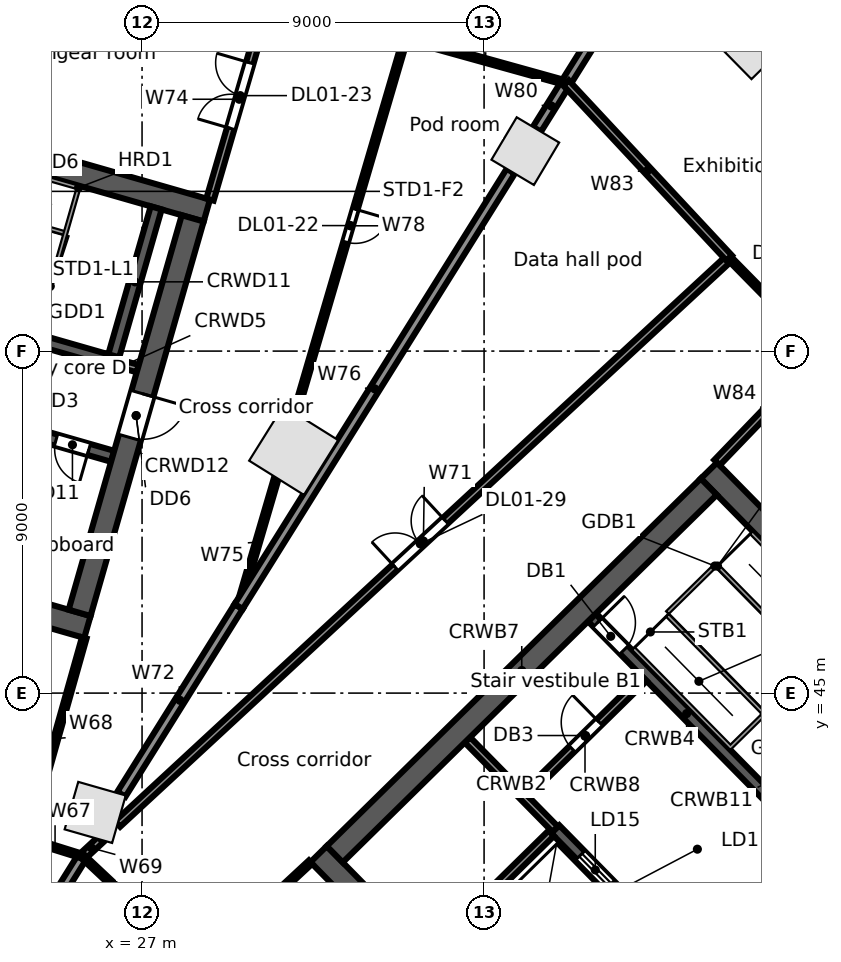
"""IFC4 building model, lengths in metres.
Left out: names, types, materials, properties, quantities, classifications, styles, units other than length and angle.
Written with IfcOpenShell. Run it as: python <this file> out.ifc"""

import sys

from ifc_helpers import new_model, si_unit, direction, frame, frame_2d, origin, origin_2d, place, context, subcontext, project, spatial, rectangle, extrude, element, fill, save


model = new_model("IFC4")
c1 = context("Model", 3, precision=1e-05, world=origin(), true_north=direction((0.0, 1.0)))
c2 = subcontext(c1, "Body", "Model", "MODEL_VIEW")
j1 = project(units=[si_unit("LENGTHUNIT", "METRE"), si_unit("PLANEANGLEUNIT", "RADIAN")], contexts=[c1])
p1 = place(None, origin())
s1 = spatial("IfcSite", under=j1, at=p1, CompositionType="ELEMENT")
p2 = place(p1, origin())
s2 = spatial("IfcBuilding", under=s1, at=p2, CompositionType="ELEMENT")
p3 = place(p2, frame((0.0, 0.0, 11.5)))
s3 = spatial("IfcBuildingStorey", under=s2, at=p3, CompositionType="ELEMENT", Elevation=11.5)
for number, where, z_axis, x_axis in (
    (1, (37.085, 59.262, 0.0), (0.0, 0.0, 1.0), (-0.859, 0.511, 0.0)),
    (2, (25.767, 41.86, 0.0), (0.0, 0.0, 1.0), (0.961, -0.276, 0.0)),
):
    element("IfcColumn", number, at=place(p3, frame(where, z_axis=z_axis, x_axis=x_axis)), inside=s3, PredefinedType="COLUMN", context=c2, shape_type="SweptSolid", body=[
        extrude(rectangle(XDim=1.3, YDim=1.3, at=origin_2d()), origin(), (0.0, 0.0, 1.0), 5.0),
    ])
p4 = place(p3, frame((30.99, 51.386, 0.0), z_axis=(0.0, 0.0, 1.0), x_axis=(0.529919264233, 0.848048096156, 0.0)))
e3 = element("IfcColumn", 3, at=p4, inside=s3, PredefinedType="COLUMN", context=c2, shape_type="SweptSolid", body=[
    extrude(rectangle(XDim=1.7, YDim=1.7, at=origin_2d()), origin(), (0.0, 0.0, 1.0), 5.0),
])
p5 = place(p3, frame((43.042, 61.863, 0.0), z_axis=(0.0, 0.0, 1.0), x_axis=(-0.7009092643, 0.713250449154, 0.0)))
e4 = element("IfcColumn", 4, at=p5, inside=s3, PredefinedType="COLUMN", context=c2, shape_type="SweptSolid", body=[
    extrude(rectangle(XDim=1.0, YDim=1.0, at=origin_2d()), origin(), (0.0, 0.0, 1.0), 5.0),
])
p6 = place(p3, frame((31.646, 40.763, 0.0), z_axis=(0.0, 0.0, 1.0), x_axis=(0.700911255944, -0.713248491965, 0.0)))
e5 = element("IfcWall", 5, at=p6, inside=s3, PredefinedType="SOLIDWALL", context=c2, shape_type="SweptSolid", body=[
    extrude(rectangle(XDim=15.0, YDim=0.6, at=frame_2d((7.5, 0.0))), origin(), (0.0, 0.0, 1.0), 4.65),
])
p7 = place(p6, frame((12.9, 0.0, 0.0)))
e6 = element("IfcOpeningElement", 6, at=p7, cuts=e5, PredefinedType="OPENING", context=c2, shape_type="SweptSolid", body=[
    extrude(rectangle(XDim=1.2, YDim=2.1, at=frame_2d((0.6, 1.05))), frame((0.0, 0.31, 0.0), z_axis=(0.0, -1.0, 0.0), x_axis=(1.0, 0.0, 0.0)), (0.0, 0.0, 1.0), 0.62),
])
p8 = place(p3, frame((35.561, 43.769, 0.0), z_axis=(0.0, 0.0, 1.0), x_axis=(0.70090232736, -0.713257266, 0.0)))
e7 = element("IfcWall", 7, at=p8, inside=s3, PredefinedType="SOLIDWALL", context=c2, shape_type="SweptSolid", body=[
    extrude(rectangle(XDim=3.3, YDim=0.2, at=frame_2d((1.65, 0.0))), origin(), (0.0, 0.0, 1.0), 4.65),
])
p9 = place(p3, frame((37.874, 41.416, 0.0), z_axis=(0.0, 0.0, 1.0), x_axis=(0.700918271237, -0.71324159795, 0.0)))
e8 = element("IfcWall", 8, at=p9, inside=s3, PredefinedType="SOLIDWALL", context=c2, shape_type="SweptSolid", body=[
    extrude(rectangle(XDim=8.4, YDim=0.3, at=frame_2d((4.2, 0.0))), origin(), (0.0, 0.0, 1.0), 4.65),
])
p10 = place(p9, frame((0.95, 0.0, 0.0)))
e9 = element("IfcOpeningElement", 9, at=p10, cuts=e8, PredefinedType="OPENING", context=c2, shape_type="SweptSolid", body=[
    extrude(rectangle(XDim=1.1, YDim=2.1, at=frame_2d((0.55, 1.05))), frame((0.0, 0.16, 0.0), z_axis=(0.0, -1.0, 0.0), x_axis=(1.0, 0.0, 0.0)), (0.0, 0.0, 1.0), 0.32),
])
p11 = place(p9, frame((3.95, 0.0, 0.0)))
e10 = element("IfcOpeningElement", 10, at=p11, cuts=e8, PredefinedType="OPENING", context=c2, shape_type="SweptSolid", body=[
    extrude(rectangle(XDim=1.1, YDim=2.1, at=frame_2d((0.55, 1.05))), frame((0.0, 0.16, 0.0), z_axis=(0.0, -1.0, 0.0), x_axis=(1.0, 0.0, 0.0)), (0.0, 0.0, 1.0), 0.32),
])
p12 = place(p9, frame((6.65, 0.0, 0.0)))
e11 = element("IfcOpeningElement", 11, at=p12, cuts=e8, PredefinedType="OPENING", context=c2, shape_type="SweptSolid", body=[
    extrude(rectangle(XDim=1.1, YDim=2.1, at=frame_2d((0.55, 1.05))), frame((0.0, 0.16, 0.0), z_axis=(0.0, -1.0, 0.0), x_axis=(1.0, 0.0, 0.0)), (0.0, 0.0, 1.0), 0.32),
])
p13 = place(p3, frame((38.842, 46.993, 0.0), z_axis=(0.0, 0.0, 1.0), x_axis=(0.700907701701, -0.713251984713, 0.0)))
e12 = element("IfcWall", 12, at=p13, inside=s3, PredefinedType="SOLIDWALL", context=c2, shape_type="SweptSolid", body=[
    extrude(rectangle(XDim=7.1, YDim=0.3, at=frame_2d((3.55, 0.0))), origin(), (0.0, 0.0, 1.0), 4.65),
])
p14 = place(p13, frame((0.2, 0.0, 0.0)))
e13 = element("IfcOpeningElement", 13, at=p14, cuts=e12, PredefinedType="OPENING", context=c2, shape_type="SweptSolid", body=[
    extrude(rectangle(XDim=1.0, YDim=2.1, at=frame_2d((0.5, 1.05))), frame((0.0, 0.16, 0.0), z_axis=(0.0, -1.0, 0.0), x_axis=(1.0, 0.0, 0.0)), (0.0, 0.0, 1.0), 0.32),
])
p15 = place(p3, frame((41.917, 50.856, 0.0), z_axis=(0.0, 0.0, 1.0), x_axis=(0.700911255944, -0.713248491965, 0.0)))
e14 = element("IfcWall", 14, at=p15, inside=s3, PredefinedType="SOLIDWALL", context=c2, shape_type="SweptSolid", body=[
    extrude(rectangle(XDim=15.0, YDim=0.6, at=frame_2d((7.5, 0.0))), origin(), (0.0, 0.0, 1.0), 4.65),
])
p16 = place(p3, frame((32.07, 40.759, 0.0), z_axis=(0.0, 0.0, 1.0), x_axis=(0.713245344712, 0.70091445858, 0.0)))
e15 = element("IfcWall", 15, at=p16, inside=s3, PredefinedType="SOLIDWALL", context=c2, shape_type="SweptSolid", body=[
    extrude(rectangle(XDim=13.8, YDim=0.6, at=frame_2d((6.9, 0.0))), origin(), (0.0, 0.0, 1.0), 4.65),
])
p17 = place(p3, frame((37.104, 42.342, 0.0), z_axis=(0.0, 0.0, 1.0), x_axis=(0.713281298468, 0.700877870428, 0.0)))
e16 = element("IfcWall", 16, at=p17, inside=s3, PredefinedType="PARTITIONING", context=c2, shape_type="SweptSolid", body=[
    extrude(rectangle(XDim=4.35, YDim=0.2, at=frame_2d((2.175, 0.0))), origin(), (0.0, 0.0, 1.0), 4.65),
])
p18 = place(p17, frame((1.7, 0.0, 0.0)))
e17 = element("IfcOpeningElement", 17, at=p18, cuts=e16, PredefinedType="OPENING", context=c2, shape_type="SweptSolid", body=[
    extrude(rectangle(XDim=1.0, YDim=2.1, at=frame_2d((0.5, 1.05))), frame((0.0, 0.11, 0.0), z_axis=(0.0, -1.0, 0.0), x_axis=(1.0, 0.0, 0.0)), (0.0, 0.0, 1.0), 0.22),
])
p19 = place(p3, frame((34.593, 38.191, 0.0), z_axis=(0.0, 0.0, 1.0), x_axis=(0.713252216116, 0.700907466222, 0.0)))
e18 = element("IfcWall", 18, at=p19, inside=s3, PredefinedType="SOLIDWALL", context=c2, shape_type="SweptSolid", body=[
    extrude(rectangle(XDim=4.45, YDim=0.2, at=frame_2d((2.225, 0.0))), origin(), (0.0, 0.0, 1.0), 4.65),
])
p20 = place(p3, frame((42.163, 30.488, 0.0), z_axis=(0.0, 0.0, 1.0), x_axis=(0.713245344712, 0.70091445858, 0.0)))
e19 = element("IfcWall", 19, at=p20, inside=s3, PredefinedType="SOLIDWALL", context=c2, shape_type="SweptSolid", body=[
    extrude(rectangle(XDim=13.8, YDim=0.6, at=frame_2d((6.9, 0.0))), origin(), (0.0, 0.0, 1.0), 4.65),
])
p21 = place(p3, frame((16.911, 49.221, 0.0), z_axis=(0.0, 0.0, 1.0), x_axis=(0.96126248289, -0.275634611374, 0.0)))
e20 = element("IfcWall", 20, at=p21, inside=s3, PredefinedType="SOLIDWALL", context=c2, shape_type="SweptSolid", body=[
    extrude(rectangle(XDim=9.0, YDim=0.6, at=frame_2d((4.5, 0.0))), origin(), (0.0, 0.0, 1.0), 4.65),
])
p22 = place(p3, frame((21.131, 52.692, 0.0), z_axis=(0.0, 0.0, 1.0), x_axis=(0.961271492568, -0.275603188616, 0.0)))
e21 = element("IfcWall", 21, at=p22, inside=s3, PredefinedType="SOLIDWALL", context=c2, shape_type="SweptSolid", body=[
    extrude(rectangle(XDim=5.3, YDim=0.3, at=frame_2d((2.65, 0.0))), origin(), (0.0, 0.0, 1.0), 4.65),
])
p23 = place(p22, frame((0.95, 0.0, 0.0)))
e22 = element("IfcOpeningElement", 22, at=p23, cuts=e21, PredefinedType="OPENING", context=c2, shape_type="SweptSolid", body=[
    extrude(rectangle(XDim=0.9, YDim=2.1, at=frame_2d((0.45, 1.05))), frame((0.0, 0.16, 0.0), z_axis=(0.0, -1.0, 0.0), x_axis=(1.0, 0.0, 0.0)), (0.0, 0.0, 1.0), 0.32),
])
p24 = place(p22, frame((3.75, 0.0, 0.0)))
e23 = element("IfcOpeningElement", 23, at=p24, cuts=e21, PredefinedType="OPENING", context=c2, shape_type="SweptSolid", body=[
    extrude(rectangle(XDim=0.9, YDim=2.1, at=frame_2d((0.45, 1.05))), frame((0.0, 0.16, 0.0), z_axis=(0.0, -1.0, 0.0), x_axis=(1.0, 0.0, 0.0)), (0.0, 0.0, 1.0), 0.32),
])
p25 = place(p3, frame((19.389, 55.689, 0.0), z_axis=(0.0, 0.0, 1.0), x_axis=(0.961261397636, -0.275638396117, 0.0)))
e24 = element("IfcWall", 24, at=p25, inside=s3, PredefinedType="SOLIDWALL", context=c2, shape_type="SweptSolid", body=[
    extrude(rectangle(XDim=7.1, YDim=0.3, at=frame_2d((3.55, 0.0))), origin(), (0.0, 0.0, 1.0), 4.65),
])
p26 = place(p25, frame((0.2, 0.0, 0.0)))
e25 = element("IfcOpeningElement", 25, at=p26, cuts=e24, PredefinedType="OPENING", context=c2, shape_type="SweptSolid", body=[
    extrude(rectangle(XDim=1.0, YDim=2.1, at=frame_2d((0.5, 1.05))), frame((0.0, 0.16, 0.0), z_axis=(0.0, -1.0, 0.0), x_axis=(1.0, 0.0, 0.0)), (0.0, 0.0, 1.0), 0.32),
])
p27 = place(p3, frame((26.214, 53.732, 0.0), z_axis=(0.0, 0.0, 1.0), x_axis=(0.96122076476, -0.27578005982, 0.0)))
e26 = element("IfcWall", 26, at=p27, inside=s3, PredefinedType="SOLIDWALL", context=c2, shape_type="SweptSolid", body=[
    extrude(rectangle(XDim=0.7, YDim=0.2, at=frame_2d((0.35, 0.0))), origin(), (0.0, 0.0, 1.0), 4.65),
])
p28 = place(p3, frame((20.053, 60.18, 0.0), z_axis=(0.0, 0.0, 1.0), x_axis=(0.96126248289, -0.275634611374, 0.0)))
e27 = element("IfcWall", 27, at=p28, inside=s3, PredefinedType="SOLIDWALL", context=c2, shape_type="SweptSolid", body=[
    extrude(rectangle(XDim=9.0, YDim=0.6, at=frame_2d((4.5, 0.0))), origin(), (0.0, 0.0, 1.0), 4.65),
])
p29 = place(p3, frame((26.256, 53.876, 0.0), z_axis=(0.0, 0.0, 1.0), x_axis=(0.275612739511, 0.961268754209, 0.0)))
e28 = element("IfcWall", 28, at=p29, inside=s3, PredefinedType="SOLIDWALL", context=c2, shape_type="SweptSolid", body=[
    extrude(rectangle(XDim=4.05, YDim=0.3, at=frame_2d((2.025, 0.0))), origin(), (0.0, 0.0, 1.0), 4.65),
])
p30 = place(p3, frame((25.356, 47.112, 0.0), z_axis=(0.0, 0.0, 1.0), x_axis=(0.275631631629, 0.961263337304, 0.0)))
e29 = element("IfcWall", 29, at=p30, inside=s3, PredefinedType="SOLIDWALL", context=c2, shape_type="SweptSolid", body=[
    extrude(rectangle(XDim=10.8, YDim=0.6, at=frame_2d((5.4, 0.0))), origin(), (0.0, 0.0, 1.0), 4.65),
])
p31 = place(p30, frame((4.8, 0.0, 0.0)))
e30 = element("IfcOpeningElement", 30, at=p31, cuts=e29, PredefinedType="OPENING", context=c2, shape_type="SweptSolid", body=[
    extrude(rectangle(XDim=1.2, YDim=2.1, at=frame_2d((0.6, 1.05))), frame((0.0, 0.31, 0.0), z_axis=(0.0, -1.0, 0.0), x_axis=(1.0, 0.0, 0.0)), (0.0, 0.0, 1.0), 0.62),
])
p32 = place(p3, frame((23.397, 37.442, 0.0), z_axis=(0.0, 0.0, 1.0), x_axis=(0.529805058875, 0.848119448893, 0.0)))
e31 = element("IfcWall", 31, at=p32, inside=s3, PredefinedType="PARTITIONING", context=c2, shape_type="SweptSolid", body=[
    extrude(rectangle(XDim=3.849, YDim=0.25, at=frame_2d((1.924, 0.0))), origin(), (0.0, 0.0, 1.0), 3.712),
])
p33 = place(p32, frame((0.95, 0.0, 0.0)))
e32 = element("IfcOpeningElement", 32, at=p33, cuts=e31, PredefinedType="OPENING", context=c2, shape_type="SweptSolid", body=[
    extrude(rectangle(XDim=1.8, YDim=2.1, at=frame_2d((0.9, 1.05))), frame((0.0, 0.135, 0.0), z_axis=(0.0, -1.0, 0.0), x_axis=(1.0, 0.0, 0.0)), (0.0, 0.0, 1.0), 0.27),
])
p34 = place(p3, frame((23.986, 41.159, 0.0), z_axis=(0.0, 0.0, 1.0), x_axis=(0.954522865266, -0.298137719325, 0.0)))
e33 = element("IfcWall", 33, at=p34, inside=s3, PredefinedType="PARTITIONING", context=c2, shape_type="SweptSolid", body=[
    extrude(rectangle(XDim=1.519, YDim=0.125, at=frame_2d((0.76, 0.0))), origin(), (0.0, 0.0, 1.0), 3.712),
])
p35 = place(p3, frame((23.986, 41.159, 0.0), z_axis=(0.0, 0.0, 1.0), x_axis=(0.271465437068, 0.962448188983, 0.0)))
e34 = element("IfcWall", 34, at=p35, inside=s3, PredefinedType="PARTITIONING", context=c2, shape_type="SweptSolid", body=[
    extrude(rectangle(XDim=5.5, YDim=0.125, at=frame_2d((2.75, 0.0))), origin(), (0.0, 0.0, 1.0), 3.93),
])
p36 = place(p3, frame((25.436, 40.706, 0.0), z_axis=(0.0, 0.0, 1.0), x_axis=(0.733725630695, 0.679445876329, 0.0)))
e35 = element("IfcWall", 35, at=p36, inside=s3, PredefinedType="PARTITIONING", context=c2, shape_type="SweptSolid", body=[
    extrude(rectangle(XDim=0.643, YDim=0.2, at=frame_2d((0.322, 0.0))), origin(), (0.0, 0.0, 1.0), 4.65),
])
p37 = place(p3, frame((25.436, 40.706, 0.0), z_axis=(0.0, 0.0, 1.0), x_axis=(0.729011488135, -0.684501461041, 0.0)))
e36 = element("IfcWall", 36, at=p37, inside=s3, PredefinedType="PARTITIONING", context=c2, shape_type="SweptSolid", body=[
    extrude(rectangle(XDim=4.202, YDim=0.125, at=frame_2d((2.101, 0.0))), origin(), (0.0, 0.0, 1.0), 4.65),
])
p38 = place(p37, frame((1.7, 0.0, 0.0)))
e37 = element("IfcOpeningElement", 37, at=p38, cuts=e36, PredefinedType="OPENING", context=c2, shape_type="SweptSolid", body=[
    extrude(rectangle(XDim=0.9, YDim=2.1, at=frame_2d((0.45, 1.05))), frame((0.0, 0.073, 0.0), z_axis=(0.0, -1.0, 0.0), x_axis=(1.0, 0.0, 0.0)), (0.0, 0.0, 1.0), 0.145),
])
p39 = place(p3, frame((26.356, 41.557, 0.0), z_axis=(0.0, 0.0, 1.0), x_axis=(0.734047402287, 0.679098233834, 0.0)))
e38 = element("IfcWall", 38, at=p39, inside=s3, PredefinedType="PARTITIONING", context=c2, shape_type="SweptSolid", body=[
    extrude(rectangle(XDim=21.926, YDim=0.2, at=frame_2d((10.963, 0.0))), origin(), (0.0, 0.0, 1.0), 3.73),
])
p40 = place(p39, frame((9.95, 0.0, 0.0)))
e39 = element("IfcOpeningElement", 39, at=p40, cuts=e38, PredefinedType="OPENING", context=c2, shape_type="SweptSolid", body=[
    extrude(rectangle(XDim=1.8, YDim=2.1, at=frame_2d((0.9, 1.05))), frame((0.0, 0.11, 0.0), z_axis=(0.0, -1.0, 0.0), x_axis=(1.0, 0.0, 0.0)), (0.0, 0.0, 1.0), 0.22),
])
p41 = place(p3, frame((26.456, 42.338, 0.0), z_axis=(0.0, 0.0, 1.0), x_axis=(0.529836963461, 0.848099517834, 0.0)))
e40 = element("IfcWall", 40, at=p41, inside=s3, PredefinedType="PARTITIONING", context=c2, shape_type="SweptSolid", body=[
    extrude(rectangle(XDim=5.826, YDim=0.25, at=frame_2d((2.913, 0.0))), origin(), (0.0, 0.0, 1.0), 3.712),
])
p42 = place(p3, frame((28.499, 37.83, 0.0), z_axis=(0.0, 0.0, 1.0), x_axis=(0.732973836409, 0.680256830278, 0.0)))
e41 = element("IfcWall", 41, at=p42, inside=s3, PredefinedType="PARTITIONING", context=c2, shape_type="SweptSolid", body=[
    extrude(rectangle(XDim=4.001, YDim=0.125, at=frame_2d((2.0, 0.0))), origin(), (0.0, 0.0, 1.0), 3.93),
])
p43 = place(p3, frame((28.787, 57.987, 0.0), z_axis=(0.0, 0.0, 1.0), x_axis=(0.279752860161, 0.960072047938, 0.0)))
e42 = element("IfcWall", 42, at=p43, inside=s3, PredefinedType="PARTITIONING", context=c2, shape_type="SweptSolid", body=[
    extrude(rectangle(XDim=5.501, YDim=0.2, at=frame_2d((2.75, 0.0))), origin(), (0.0, 0.0, 1.0), 3.922),
])
p44 = place(p43, frame((1.95, 0.0, 0.0)))
e43 = element("IfcOpeningElement", 43, at=p44, cuts=e42, PredefinedType="OPENING", context=c2, shape_type="SweptSolid", body=[
    extrude(rectangle(XDim=1.8, YDim=2.1, at=frame_2d((0.9, 1.05))), frame((0.0, 0.11, 0.0), z_axis=(0.0, -1.0, 0.0), x_axis=(1.0, 0.0, 0.0)), (0.0, 0.0, 1.0), 0.22),
])
p45 = place(p3, frame((29.543, 47.279, 0.0), z_axis=(0.0, 0.0, 1.0), x_axis=(0.28156355079, 0.959542582102, 0.0)))
e44 = element("IfcWall", 44, at=p45, inside=s3, PredefinedType="PARTITIONING", context=c2, shape_type="SweptSolid", body=[
    extrude(rectangle(XDim=3.531, YDim=0.125, at=frame_2d((1.765, 0.0))), origin(), (0.0, 0.0, 1.0), 3.712),
])
p46 = place(p3, frame((29.543, 47.279, 0.0), z_axis=(0.0, 0.0, 1.0), x_axis=(0.529929076845, 0.848041964477, 0.0)))
e45 = element("IfcWall", 45, at=p46, inside=s3, PredefinedType="PARTITIONING", context=c2, shape_type="SweptSolid", body=[
    extrude(rectangle(XDim=13.507, YDim=0.25, at=frame_2d((6.754, 0.0))), origin(), (0.0, 0.0, 1.0), 3.73),
])
p47 = place(p3, frame((31.034, 52.361, 0.0), z_axis=(0.0, 0.0, 1.0), x_axis=(0.281471237406, 0.959569665273, 0.0)))
e46 = element("IfcWall", 46, at=p47, inside=s3, PredefinedType="PARTITIONING", context=c2, shape_type="SweptSolid", body=[
    extrude(rectangle(XDim=10.289, YDim=0.125, at=frame_2d((5.145, 0.0))), origin(), (0.0, 0.0, 1.0), 3.922),
])
p48 = place(p47, frame((4.7, 0.0, 0.0)))
e47 = element("IfcOpeningElement", 47, at=p48, cuts=e46, PredefinedType="OPENING", context=c2, shape_type="SweptSolid", body=[
    extrude(rectangle(XDim=0.9, YDim=2.1, at=frame_2d((0.45, 1.05))), frame((0.0, 0.073, 0.0), z_axis=(0.0, -1.0, 0.0), x_axis=(1.0, 0.0, 0.0)), (0.0, 0.0, 1.0), 0.145),
])
p49 = place(p3, frame((33.93, 62.234, 0.0), z_axis=(0.0, 0.0, 1.0), x_axis=(0.963433299433, -0.267948274007, 0.0)))
e48 = element("IfcWall", 48, at=p49, inside=s3, PredefinedType="PARTITIONING", context=c2, shape_type="SweptSolid", body=[
    extrude(rectangle(XDim=4.385, YDim=0.125, at=frame_2d((2.192, 0.0))), origin(), (0.0, 0.0, 1.0), 4.018),
])
p50 = place(p3, frame((37.39, 59.837, 0.0), z_axis=(0.0, 0.0, 1.0), x_axis=(0.530151180786, 0.84790313451, 0.0)))
e49 = element("IfcWall", 49, at=p50, inside=s3, PredefinedType="PARTITIONING", context=c2, shape_type="SweptSolid", body=[
    extrude(rectangle(XDim=1.441, YDim=0.25, at=frame_2d((0.721, 0.0))), origin(), (0.0, 0.0, 1.0), 4.65),
])
p51 = place(p3, frame((38.154, 61.059, 0.0), z_axis=(0.0, 0.0, 1.0), x_axis=(0.529921368013, 0.848046781565, 0.0)))
e50 = element("IfcWall", 50, at=p51, inside=s3, PredefinedType="PARTITIONING", context=c2, shape_type="SweptSolid", body=[
    extrude(rectangle(XDim=3.961, YDim=0.25, at=frame_2d((1.98, 0.0))), origin(), (0.0, 0.0, 1.0), 4.024),
])
p52 = place(p3, frame((38.154, 61.059, 0.0), z_axis=(0.0, 0.0, 1.0), x_axis=(0.681663875787, -0.731665470312, 0.0)))
e51 = element("IfcWall", 51, at=p52, inside=s3, PredefinedType="PARTITIONING", context=c2, shape_type="SweptSolid", body=[
    extrude(rectangle(XDim=6.303, YDim=0.2, at=frame_2d((3.152, 0.0))), origin(), (0.0, 0.0, 1.0), 4.018),
])
p53 = place(p3, frame((42.13, 51.066, 0.0), z_axis=(0.0, 0.0, 1.0), x_axis=(0.693124563472, 0.720817826855, 0.0)))
e52 = element("IfcWall", 52, at=p53, inside=s3, PredefinedType="PARTITIONING", context=c2, shape_type="SweptSolid", body=[
    extrude(rectangle(XDim=4.002, YDim=0.2, at=frame_2d((2.001, 0.0))), origin(), (0.0, 0.0, 1.0), 3.83),
])
p54 = place(p3, frame((42.451, 56.447, 0.0), z_axis=(0.0, 0.0, 1.0), x_axis=(0.700941316052, -0.713218950569, 0.0)))
e53 = element("IfcWall", 53, at=p54, inside=s3, PredefinedType="PARTITIONING", context=c2, shape_type="SweptSolid", body=[
    extrude(rectangle(XDim=3.5, YDim=0.125, at=frame_2d((1.75, 0.0))), origin(), (0.0, 0.0, 1.0), 4.65),
])
p55 = place(p54, frame((1.2, 0.0, 0.0)))
e54 = element("IfcOpeningElement", 54, at=p55, cuts=e53, PredefinedType="OPENING", context=c2, shape_type="SweptSolid", body=[
    extrude(rectangle(XDim=0.9, YDim=2.1, at=frame_2d((0.45, 1.05))), frame((0.0, 0.073, 0.0), z_axis=(0.0, -1.0, 0.0), x_axis=(1.0, 0.0, 0.0)), (0.0, 0.0, 1.0), 0.145),
])
p56 = place(p10, origin())
e55 = element("IfcDoor", 55, at=p56, inside=s3, OperationType="DOUBLE_DOOR_SLIDING", PredefinedType="DOOR", context=c2, shape_type="SweptSolid", body=[
    extrude(rectangle(XDim=1.1, YDim=2.1, at=frame_2d((0.55, 1.05))), frame((0.0, 0.025, 0.0), z_axis=(0.0, -1.0, 0.0), x_axis=(1.0, 0.0, 0.0)), (0.0, 0.0, 1.0), 0.05),
])
fill(e9, e55)
p57 = place(p14, origin())
e56 = element("IfcDoor", 56, at=p57, inside=s3, OperationType="SINGLE_SWING_LEFT", PredefinedType="DOOR", context=c2, shape_type="SweptSolid", body=[
    extrude(rectangle(XDim=1.0, YDim=2.1, at=frame_2d((0.5, 1.05))), frame((0.0, 0.025, 0.0), z_axis=(0.0, -1.0, 0.0), x_axis=(1.0, 0.0, 0.0)), (0.0, 0.0, 1.0), 0.05),
])
fill(e13, e56)
p58 = place(p18, origin())
e57 = element("IfcDoor", 57, at=p58, inside=s3, OperationType="SINGLE_SWING_RIGHT", PredefinedType="DOOR", context=c2, shape_type="SweptSolid", body=[
    extrude(rectangle(XDim=1.0, YDim=2.1, at=frame_2d((0.5, 1.05))), frame((0.0, 0.025, 0.0), z_axis=(0.0, -1.0, 0.0), x_axis=(1.0, 0.0, 0.0)), (0.0, 0.0, 1.0), 0.05),
])
fill(e17, e57)
p59 = place(p31, frame((1.2, 0.0, 0.0), z_axis=(0.0, 0.0, 1.0), x_axis=(-1.0, 0.0, 0.0)))
e58 = element("IfcDoor", 58, at=p59, inside=s3, OperationType="SINGLE_SWING_LEFT", PredefinedType="DOOR", context=c2, shape_type="SweptSolid", body=[
    extrude(rectangle(XDim=1.2, YDim=2.1, at=frame_2d((0.6, 1.05))), frame((0.0, 0.025, 0.0), z_axis=(0.0, -1.0, 0.0), x_axis=(1.0, 0.0, 0.0)), (0.0, 0.0, 1.0), 0.05),
])
fill(e30, e58)
p60 = place(p24, frame((0.9, 0.0, 0.0), z_axis=(0.0, 0.0, 1.0), x_axis=(-1.0, 0.0, 0.0)))
e59 = element("IfcDoor", 59, at=p60, inside=s3, OperationType="SINGLE_SWING_LEFT", PredefinedType="DOOR", context=c2, shape_type="SweptSolid", body=[
    extrude(rectangle(XDim=0.9, YDim=2.1, at=frame_2d((0.45, 1.05))), frame((0.0, 0.025, 0.0), z_axis=(0.0, -1.0, 0.0), x_axis=(1.0, 0.0, 0.0)), (0.0, 0.0, 1.0), 0.05),
])
fill(e23, e59)
p61 = place(p48, frame((0.9, 0.0, 0.0), z_axis=(0.0, 0.0, 1.0), x_axis=(-1.0, 0.0, 0.0)))
e60 = element("IfcDoor", 60, at=p61, inside=s3, OperationType="SINGLE_SWING_LEFT", PredefinedType="DOOR", context=c2, shape_type="SweptSolid", body=[
    extrude(rectangle(XDim=0.9, YDim=2.1, at=frame_2d((0.45, 1.05))), frame((0.0, 0.025, 0.0), z_axis=(0.0, -1.0, 0.0), x_axis=(1.0, 0.0, 0.0)), (0.0, 0.0, 1.0), 0.05),
])
fill(e47, e60)
p62 = place(p44, origin())
e61 = element("IfcDoor", 61, at=p62, inside=s3, OperationType="DOUBLE_DOOR_SINGLE_SWING", PredefinedType="DOOR", context=c2, shape_type="SweptSolid", body=[
    extrude(rectangle(XDim=1.8, YDim=2.1, at=frame_2d((0.9, 1.05))), frame((0.0, 0.025, 0.0), z_axis=(0.0, -1.0, 0.0), x_axis=(1.0, 0.0, 0.0)), (0.0, 0.0, 1.0), 0.05),
])
fill(e43, e61)
p63 = place(p55, origin())
e62 = element("IfcDoor", 62, at=p63, inside=s3, OperationType="SINGLE_SWING_LEFT", PredefinedType="DOOR", context=c2, shape_type="SweptSolid", body=[
    extrude(rectangle(XDim=0.9, YDim=2.1, at=frame_2d((0.45, 1.05))), frame((0.0, 0.025, 0.0), z_axis=(0.0, -1.0, 0.0), x_axis=(1.0, 0.0, 0.0)), (0.0, 0.0, 1.0), 0.05),
])
fill(e54, e62)
p64 = place(p40, origin())
e63 = element("IfcDoor", 63, at=p64, inside=s3, OperationType="DOUBLE_DOOR_SINGLE_SWING", PredefinedType="DOOR", context=c2, shape_type="SweptSolid", body=[
    extrude(rectangle(XDim=1.8, YDim=2.1, at=frame_2d((0.9, 1.05))), frame((0.0, 0.025, 0.0), z_axis=(0.0, -1.0, 0.0), x_axis=(1.0, 0.0, 0.0)), (0.0, 0.0, 1.0), 0.05),
])
fill(e39, e63)
save(model, sys.argv[1])
